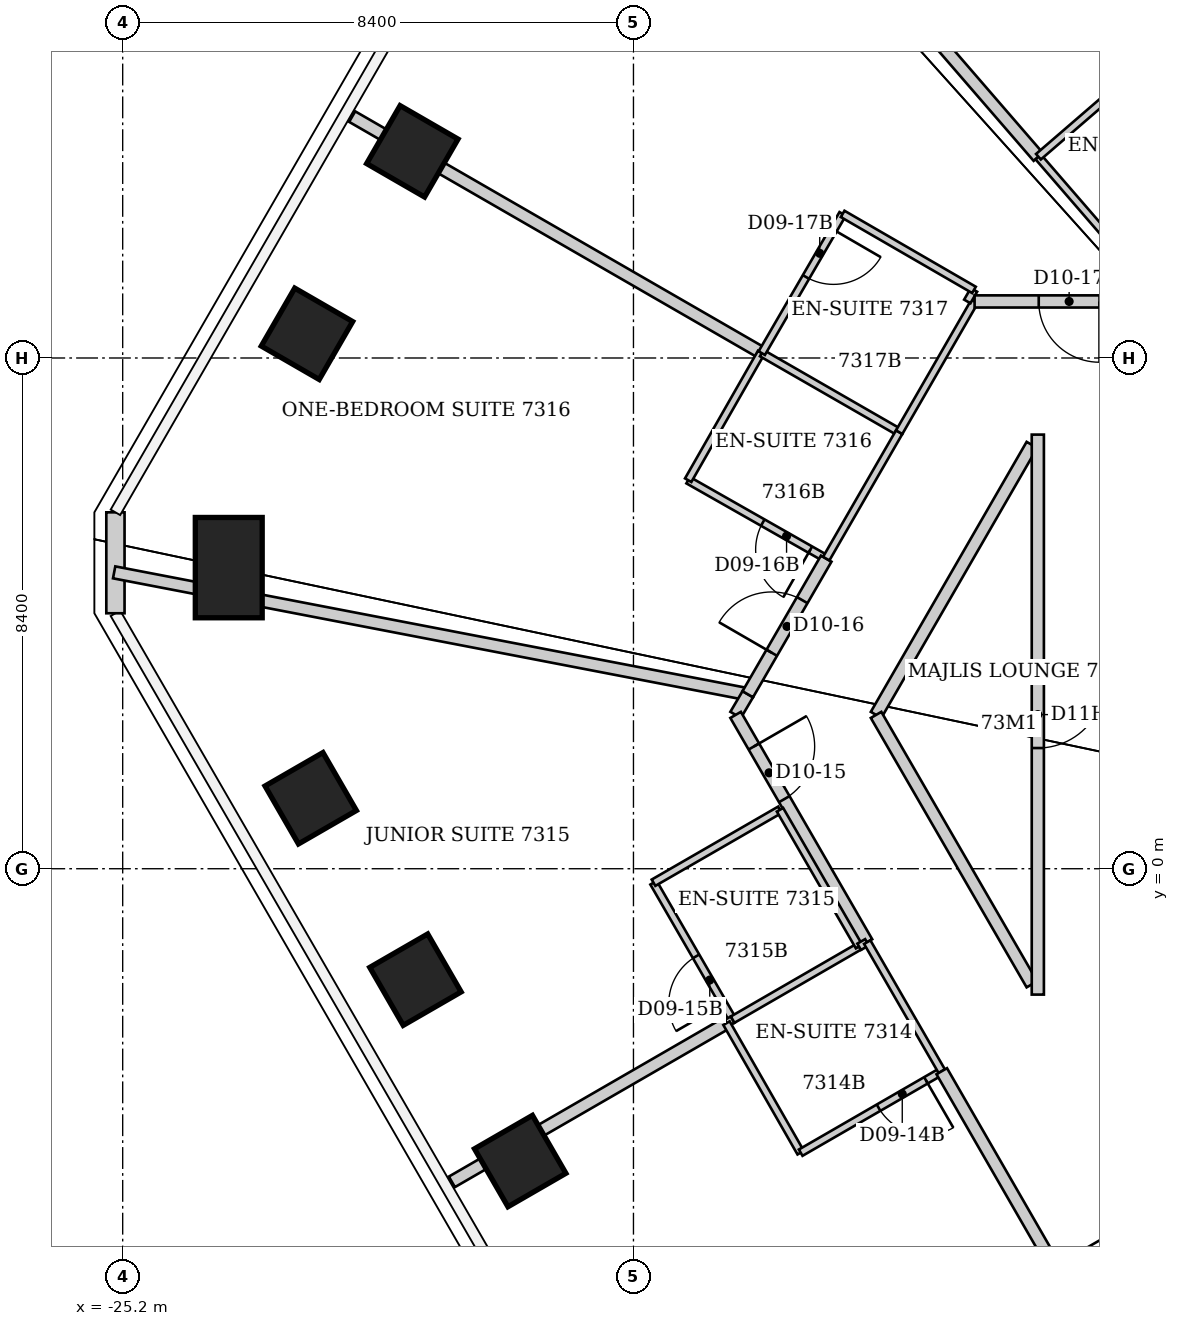
"""IFC4 building model, lengths in metres.
Left out: names, types, materials, properties, quantities, classifications, styles, units other than length and angle.
Written with IfcOpenShell. Run it as: python <this file> out.ifc"""

import sys

from ifc_helpers import new_model, si_unit, direction, frame, frame_2d, origin, origin_2d, place, context, subcontext, project, spatial, rectangle, extrude, element, fill, save


model = new_model("IFC4")
c1 = context("Model", 3, precision=1e-05, world=origin(), true_north=direction((0.0, 1.0)))
c2 = subcontext(c1, "Body", "Model", "MODEL_VIEW")
j1 = project(units=[si_unit("LENGTHUNIT", "METRE"), si_unit("PLANEANGLEUNIT", "RADIAN")], contexts=[c1])
p1 = place(None, origin())
s1 = spatial("IfcSite", under=j1, at=p1, CompositionType="ELEMENT")
p2 = place(p1, origin())
s2 = spatial("IfcBuilding", under=s1, at=p2, CompositionType="ELEMENT")
p3 = place(p2, frame((0.0, 0.0, 291.2)))
s3 = spatial("IfcBuildingStorey", under=s2, at=p3, CompositionType="ELEMENT", Elevation=291.2)
for number, where, z_axis, x_axis in (
    (1, (-18.663, -4.808, 0.0), (0.0, 0.0, 1.0), (-0.866, -0.5, 0.0)),
    (2, (-20.385, -1.824, 0.0), (0.0, 0.0, 1.0), (-0.866, -0.5, 0.0)),
    (3, (-22.108, 1.159, 0.0), (0.0, 0.0, 1.0), (-0.866, -0.5, 0.0)),
):
    element("IfcColumn", number, at=place(p3, frame(where, z_axis=z_axis, x_axis=x_axis)), inside=s3, PredefinedType="COLUMN", context=c2, shape_type="SweptSolid", body=[
        extrude(rectangle(XDim=1.1, YDim=1.1, at=origin_2d()), origin(), (0.0, 0.0, 1.0), 3.8),
    ])
p4 = place(p3, frame((-23.456, 4.952, 0.0), z_axis=(0.0, 0.0, 1.0), x_axis=(-1.0, 0.0, 0.0)))
e4 = element("IfcColumn", 4, at=p4, inside=s3, PredefinedType="COLUMN", context=c2, shape_type="SweptSolid", body=[
    extrude(rectangle(XDim=1.1, YDim=1.65, at=origin_2d()), origin(), (0.0, 0.0, 1.0), 3.8),
])
for number, where, z_axis, x_axis in (
    (5, (-22.169, 8.798, 0.0), (0.0, 0.0, 1.0), (-0.866, 0.5, 0.0)),
    (6, (-20.437, 11.799, 0.0), (0.0, 0.0, 1.0), (-0.866, 0.5, 0.0)),
):
    element("IfcColumn", number, at=place(p3, frame(where, z_axis=z_axis, x_axis=x_axis)), inside=s3, PredefinedType="COLUMN", context=c2, shape_type="SweptSolid", body=[
        extrude(rectangle(XDim=1.1, YDim=1.1, at=origin_2d()), origin(), (0.0, 0.0, 1.0), 3.8),
    ])
p5 = place(p3, frame((-25.319, 4.202, 0.0), z_axis=(0.0, 0.0, 1.0), x_axis=(0.0, 1.0, 0.0)))
e7 = element("IfcWall", 7, at=p5, inside=s3, PredefinedType="SOLIDWALL", context=c2, shape_type="SweptSolid", body=[
    extrude(rectangle(XDim=1.66, YDim=0.3, at=frame_2d((0.83, 0.0))), origin(), (0.0, 0.0, 1.0), 3.64),
])
p6 = place(p3, frame((-25.341, 4.874, 0.0), z_axis=(0.0, 0.0, 1.0), x_axis=(0.982001168061, -0.188874841966, 0.0)))
e8 = element("IfcWall", 8, at=p6, inside=s3, PredefinedType="PARTITIONING", context=c2, shape_type="SweptSolid", body=[
    extrude(rectangle(XDim=10.557, YDim=0.2, at=frame_2d((5.278, 0.0))), origin(), (0.0, 0.0, 1.0), 3.64),
])
p7 = place(p3, frame((-21.426, 12.37, 0.0), z_axis=(0.0, 0.0, 1.0), x_axis=(0.866202335538, -0.499693419917, 0.0)))
e9 = element("IfcWall", 9, at=p7, inside=s3, PredefinedType="PARTITIONING", context=c2, shape_type="SweptSolid", body=[
    extrude(rectangle(XDim=7.765, YDim=0.2, at=frame_2d((3.883, 0.0))), origin(), (0.0, 0.0, 1.0), 2.878),
])
p8 = place(p3, frame((-19.786, -5.15, 0.0), z_axis=(0.0, 0.0, 1.0), x_axis=(0.865819112627, 0.500357136663, 0.0)))
e10 = element("IfcWall", 10, at=p8, inside=s3, PredefinedType="PARTITIONING", context=c2, shape_type="SweptSolid", body=[
    extrude(rectangle(XDim=5.216, YDim=0.2, at=frame_2d((2.608, 0.0))), origin(), (0.0, 0.0, 1.0), 3.64),
])
p9 = place(p3, frame((-16.89, 19.507, 0.0), z_axis=(0.0, 0.0, 1.0), x_axis=(0.654250750888, -0.756277696989, 0.0)))
e11 = element("IfcWall", 11, at=p9, inside=s3, PredefinedType="PARTITIONING", context=c2, shape_type="SweptSolid", body=[
    extrude(rectangle(XDim=10.313, YDim=0.2, at=frame_2d((5.157, 0.0))), origin(), (0.0, 0.0, 1.0), 3.64),
])
p10 = place(p3, frame((-16.47, -0.23, 0.0), z_axis=(0.0, 0.0, 1.0), x_axis=(0.500291685314, -0.865856933682, 0.0)))
e12 = element("IfcWall", 12, at=p10, inside=s3, PredefinedType="PARTITIONING", context=c2, shape_type="SweptSolid", body=[
    extrude(rectangle(XDim=2.599, YDim=0.12, at=frame_2d((1.299, 0.0))), origin(), (0.0, 0.0, 1.0), 3.64),
])
p11 = place(p10, frame((1.399, 0.0, 0.0)))
e13 = element("IfcOpeningElement", 13, at=p11, cuts=e12, PredefinedType="OPENING", context=c2, shape_type="SweptSolid", body=[
    extrude(rectangle(XDim=0.9, YDim=2.03, at=frame_2d((0.45, 1.015))), frame((0.0, 0.06, 0.0), z_axis=(0.0, -1.0, 0.0), x_axis=(1.0, 0.0, 0.0)), (0.0, 0.0, 1.0), 0.12),
])
p12 = place(p3, frame((-15.9, 6.39, 0.0), z_axis=(0.0, 0.0, 1.0), x_axis=(0.869431908012, -0.494052787999, 0.0)))
e14 = element("IfcWall", 14, at=p12, inside=s3, PredefinedType="PARTITIONING", context=c2, shape_type="SweptSolid", body=[
    extrude(rectangle(XDim=2.611, YDim=0.12, at=frame_2d((1.305, 0.0))), origin(), (0.0, 0.0, 1.0), 3.64),
])
p13 = place(p12, frame((1.411, 0.0, 0.0)))
e15 = element("IfcOpeningElement", 15, at=p13, cuts=e14, PredefinedType="OPENING", context=c2, shape_type="SweptSolid", body=[
    extrude(rectangle(XDim=0.9, YDim=2.03, at=frame_2d((0.45, 1.015))), frame((0.0, 0.06, 0.0), z_axis=(0.0, -1.0, 0.0), x_axis=(1.0, 0.0, 0.0)), (0.0, 0.0, 1.0), 0.12),
])
p14 = place(p3, frame((-15.27, -2.54, 0.0), z_axis=(0.0, 0.0, 1.0), x_axis=(0.864612942288, 0.502438513678, 0.0)))
e16 = element("IfcWall", 16, at=p14, inside=s3, PredefinedType="PARTITIONING", context=c2, shape_type="SweptSolid", body=[
    extrude(rectangle(XDim=0.117, YDim=0.12, at=frame_2d((0.058, 0.0))), origin(), (0.0, 0.0, 1.0), 3.64),
])
p15 = place(p3, frame((-15.27, -2.54, 0.0), z_axis=(0.0, 0.0, 1.0), x_axis=(0.497027744361, -0.86773464915, 0.0)))
e17 = element("IfcWall", 17, at=p15, inside=s3, PredefinedType="PARTITIONING", context=c2, shape_type="SweptSolid", body=[
    extrude(rectangle(XDim=2.455, YDim=0.12, at=frame_2d((1.227, 0.0))), origin(), (0.0, 0.0, 1.0), 3.64),
])
p16 = place(p3, frame((-15.169, -2.482, 0.0), z_axis=(0.0, 0.0, 1.0), x_axis=(0.865723129019, 0.500523190154, 0.0)))
e18 = element("IfcWall", 18, at=p16, inside=s3, PredefinedType="PARTITIONING", context=c2, shape_type="SweptSolid", body=[
    extrude(rectangle(XDim=2.401, YDim=0.12, at=frame_2d((1.201, 0.0))), origin(), (0.0, 0.0, 1.0), 3.64),
])
p17 = place(p3, frame((-15.12, 2.53, 0.0), z_axis=(0.0, 0.0, 1.0), x_axis=(0.507290461451, 0.861775137562, 0.0)))
e19 = element("IfcWall", 19, at=p17, inside=s3, PredefinedType="PARTITIONING", context=c2, shape_type="SweptSolid", body=[
    extrude(rectangle(XDim=0.395, YDim=0.2, at=frame_2d((0.197, 0.0))), origin(), (0.0, 0.0, 1.0), 3.64),
])
p18 = place(p3, frame((-15.12, 2.53, 0.0), z_axis=(0.0, 0.0, 1.0), x_axis=(0.500151395541, -0.865937977882, 0.0)))
e20 = element("IfcWall", 20, at=p18, inside=s3, PredefinedType="PARTITIONING", context=c2, shape_type="SweptSolid", body=[
    extrude(rectangle(XDim=4.319, YDim=0.2, at=frame_2d((2.16, 0.0))), origin(), (0.0, 0.0, 1.0), 3.64),
])
p19 = place(p18, frame((0.6, 0.0, 0.0)))
e21 = element("IfcOpeningElement", 21, at=p19, cuts=e20, PredefinedType="OPENING", context=c2, shape_type="SweptSolid", body=[
    extrude(rectangle(XDim=1.0, YDim=2.13, at=frame_2d((0.5, 1.065))), frame((0.0, 0.1, 0.0), z_axis=(0.0, -1.0, 0.0), x_axis=(1.0, 0.0, 0.0)), (0.0, 0.0, 1.0), 0.2),
])
p20 = place(p3, frame((-14.92, 2.87, 0.0), z_axis=(0.0, 0.0, 1.0), x_axis=(0.500714932888, 0.865612243434, 0.0)))
e22 = element("IfcWall", 22, at=p20, inside=s3, PredefinedType="PARTITIONING", context=c2, shape_type="SweptSolid", body=[
    extrude(rectangle(XDim=2.576, YDim=0.2, at=frame_2d((1.288, 0.0))), origin(), (0.0, 0.0, 1.0), 3.64),
])
p21 = place(p20, frame((0.788, 0.0, 0.0)))
e23 = element("IfcOpeningElement", 23, at=p21, cuts=e22, PredefinedType="OPENING", context=c2, shape_type="SweptSolid", body=[
    extrude(rectangle(XDim=1.0, YDim=2.13, at=frame_2d((0.5, 1.065))), frame((0.0, 0.1, 0.0), z_axis=(0.0, -1.0, 0.0), x_axis=(1.0, 0.0, 0.0)), (0.0, 0.0, 1.0), 0.2),
])
p22 = place(p3, frame((-14.7, 8.49, 0.0), z_axis=(0.0, 0.0, 1.0), x_axis=(-0.496106327528, -0.868261776072, 0.0)))
e24 = element("IfcWall", 24, at=p22, inside=s3, PredefinedType="PARTITIONING", context=c2, shape_type="SweptSolid", body=[
    extrude(rectangle(XDim=2.419, YDim=0.12, at=frame_2d((1.209, 0.0))), origin(), (0.0, 0.0, 1.0), 3.64),
])
p23 = place(p3, frame((-14.69, 8.48, 0.0), z_axis=(0.0, 0.0, 1.0), x_axis=(0.866816256489, -0.498627694264, 0.0)))
e25 = element("IfcWall", 25, at=p23, inside=s3, PredefinedType="PARTITIONING", context=c2, shape_type="SweptSolid", body=[
    extrude(rectangle(XDim=2.607, YDim=0.12, at=frame_2d((1.304, 0.0))), origin(), (0.0, 0.0, 1.0), 2.878),
])
p24 = place(p3, frame((-14.39, 0.97, 0.0), z_axis=(0.0, 0.0, 1.0), x_axis=(-0.866202511239, -0.499693115345, 0.0)))
e26 = element("IfcWall", 26, at=p24, inside=s3, PredefinedType="PARTITIONING", context=c2, shape_type="SweptSolid", body=[
    extrude(rectangle(XDim=2.401, YDim=0.12, at=frame_2d((1.201, 0.0))), origin(), (0.0, 0.0, 1.0), 3.64),
])
p25 = place(p3, frame((-14.05, -4.67, 0.0), z_axis=(0.0, 0.0, 1.0), x_axis=(0.865968562295, 0.500098439427, 0.0)))
e27 = element("IfcWall", 27, at=p25, inside=s3, PredefinedType="PARTITIONING", context=c2, shape_type="SweptSolid", body=[
    extrude(rectangle(XDim=2.679, YDim=0.12, at=frame_2d((1.34, 0.0))), origin(), (0.0, 0.0, 1.0), 3.64),
])
p26 = place(p25, frame((1.479, 0.0, 0.0)))
e28 = element("IfcOpeningElement", 28, at=p26, cuts=e27, PredefinedType="OPENING", context=c2, shape_type="SweptSolid", body=[
    extrude(rectangle(XDim=0.9, YDim=2.03, at=frame_2d((0.45, 1.015))), frame((0.0, 0.06, 0.0), z_axis=(0.0, -1.0, 0.0), x_axis=(1.0, 0.0, 0.0)), (0.0, 0.0, 1.0), 0.12),
])
p27 = place(p3, frame((-13.63, 5.1, 0.0), z_axis=(0.0, 0.0, 1.0), x_axis=(0.499737123639, 0.866177122335, 0.0)))
e29 = element("IfcWall", 29, at=p27, inside=s3, PredefinedType="PARTITIONING", context=c2, shape_type="SweptSolid", body=[
    extrude(rectangle(XDim=2.401, YDim=0.12, at=frame_2d((1.201, 0.0))), origin(), (0.0, 0.0, 1.0), 3.64),
])
p28 = place(p3, frame((-13.36, 10.77, 0.0), z_axis=(0.0, 0.0, 1.0), x_axis=(-0.502173326652, -0.864766991738, 0.0)))
e30 = element("IfcWall", 30, at=p28, inside=s3, PredefinedType="PARTITIONING", context=c2, shape_type="SweptSolid", body=[
    extrude(rectangle(XDim=2.648, YDim=0.12, at=frame_2d((1.324, 0.0))), origin(), (0.0, 0.0, 1.0), 3.64),
])
p29 = place(p28, frame((0.3, 0.0, 0.0)))
e31 = element("IfcOpeningElement", 31, at=p29, cuts=e30, PredefinedType="OPENING", context=c2, shape_type="SweptSolid", body=[
    extrude(rectangle(XDim=0.9, YDim=2.03, at=frame_2d((0.45, 1.015))), frame((0.0, 0.06, 0.0), z_axis=(0.0, -1.0, 0.0), x_axis=(1.0, 0.0, 0.0)), (0.0, 0.0, 1.0), 0.12),
])
p30 = place(p3, frame((-13.09, -1.28, 0.0), z_axis=(0.0, 0.0, 1.0), x_axis=(-0.500291685314, 0.865856933682, 0.0)))
e32 = element("IfcWall", 32, at=p30, inside=s3, PredefinedType="PARTITIONING", context=c2, shape_type="SweptSolid", body=[
    extrude(rectangle(XDim=2.599, YDim=0.12, at=frame_2d((1.299, 0.0))), origin(), (0.0, 0.0, 1.0), 3.64),
])
p31 = place(p3, frame((-13.088, -1.283, 0.0), z_axis=(0.0, 0.0, 1.0), x_axis=(0.867120749652, 0.498097987873, 0.0)))
e33 = element("IfcWall", 33, at=p31, inside=s3, PredefinedType="PARTITIONING", context=c2, shape_type="SweptSolid", body=[
    extrude(rectangle(XDim=0.147, YDim=0.12, at=frame_2d((0.074, 0.0))), origin(), (0.0, 0.0, 1.0), 3.64),
])
p32 = place(p3, frame((-12.955, -1.207, 0.0), z_axis=(0.0, 0.0, 1.0), x_axis=(0.499920767294, -0.866071143976, 0.0)))
e34 = element("IfcWall", 34, at=p32, inside=s3, PredefinedType="PARTITIONING", context=c2, shape_type="SweptSolid", body=[
    extrude(rectangle(XDim=2.451, YDim=0.12, at=frame_2d((1.226, 0.0))), origin(), (0.0, 0.0, 1.0), 3.64),
])
p33 = place(p3, frame((-12.81, 2.53, 0.0), z_axis=(0.0, 0.0, 1.0), x_axis=(0.499765047266, 0.86616101132, 0.0)))
e35 = element("IfcWall", 35, at=p33, inside=s3, PredefinedType="PARTITIONING", context=c2, shape_type="SweptSolid", body=[
    extrude(rectangle(XDim=5.127, YDim=0.2, at=frame_2d((2.564, 0.0))), origin(), (0.0, 0.0, 1.0), 3.64),
])
p34 = place(p3, frame((-12.43, 7.18, 0.0), z_axis=(0.0, 0.0, 1.0), x_axis=(0.499577688184, 0.866269088372, 0.0)))
e36 = element("IfcWall", 36, at=p34, inside=s3, PredefinedType="PARTITIONING", context=c2, shape_type="SweptSolid", body=[
    extrude(rectangle(XDim=2.482, YDim=0.12, at=frame_2d((1.241, 0.0))), origin(), (0.0, 0.0, 1.0), 3.64),
])
p35 = place(p3, frame((-11.73, -3.33, 0.0), z_axis=(0.0, 0.0, 1.0), x_axis=(0.499214067722, -0.866478686748, 0.0)))
e37 = element("IfcWall", 37, at=p35, inside=s3, PredefinedType="PARTITIONING", context=c2, shape_type="SweptSolid", body=[
    extrude(rectangle(XDim=8.413, YDim=0.2, at=frame_2d((4.207, 0.0))), origin(), (0.0, 0.0, 1.0), 3.64),
])
p36 = place(p35, frame((3.707, 0.0, 0.0)))
e38 = element("IfcOpeningElement", 38, at=p36, cuts=e37, PredefinedType="OPENING", context=c2, shape_type="SweptSolid", body=[
    extrude(rectangle(XDim=1.0, YDim=2.13, at=frame_2d((0.5, 1.065))), frame((0.0, 0.1, 0.0), z_axis=(0.0, -1.0, 0.0), x_axis=(1.0, 0.0, 0.0)), (0.0, 0.0, 1.0), 0.2),
])
p37 = place(p3, frame((-11.31, 9.33, 0.0), z_axis=(0.0, 0.0, 1.0), x_axis=(0.501518373175, 0.865146994081, 0.0)))
e39 = element("IfcWall", 39, at=p37, inside=s3, PredefinedType="PARTITIONING", context=c2, shape_type="SweptSolid", body=[
    extrude(rectangle(XDim=0.219, YDim=0.12, at=frame_2d((0.11, 0.0))), origin(), (0.0, 0.0, 1.0), 3.64),
])
p38 = place(p3, frame((-11.2, 9.52, 0.0), z_axis=(0.0, 0.0, 1.0), x_axis=(-0.865533423938, 0.500851167559, 0.0)))
e40 = element("IfcWall", 40, at=p38, inside=s3, PredefinedType="PARTITIONING", context=c2, shape_type="SweptSolid", body=[
    extrude(rectangle(XDim=2.496, YDim=0.12, at=frame_2d((1.248, 0.0))), origin(), (0.0, 0.0, 1.0), 3.64),
])
p39 = place(p3, frame((-10.248, -1.901, 0.0), z_axis=(0.0, 0.0, 1.0), x_axis=(-0.500611305161, 0.865672178798, 0.0)))
e41 = element("IfcWall", 41, at=p39, inside=s3, PredefinedType="PARTITIONING", context=c2, shape_type="SweptSolid", body=[
    extrude(rectangle(XDim=5.119, YDim=0.2, at=frame_2d((2.559, 0.0))), origin(), (0.0, 0.0, 1.0), 3.64),
])
p40 = place(p3, frame((-10.15, 7.14, 0.0), z_axis=(0.0, 0.0, 1.0), x_axis=(0.0, -1.0, 0.0)))
e42 = element("IfcWall", 42, at=p40, inside=s3, PredefinedType="PARTITIONING", context=c2, shape_type="SweptSolid", body=[
    extrude(rectangle(XDim=9.21, YDim=0.2, at=frame_2d((4.605, 0.0))), origin(), (0.0, 0.0, 1.0), 3.64),
])
p41 = place(p40, frame((4.055, 0.0, 0.0)))
e43 = element("IfcOpeningElement", 43, at=p41, cuts=e42, PredefinedType="OPENING", context=c2, shape_type="SweptSolid", body=[
    extrude(rectangle(XDim=1.1, YDim=2.2, at=frame_2d((0.55, 1.1))), frame((0.0, 0.1, 0.0), z_axis=(0.0, -1.0, 0.0), x_axis=(1.0, 0.0, 0.0)), (0.0, 0.0, 1.0), 0.2),
])
p42 = place(p3, frame((-10.143, 11.708, 0.0), z_axis=(0.0, 0.0, 1.0), x_axis=(0.65433095071, -0.756208309226, 0.0)))
e44 = element("IfcWall", 44, at=p42, inside=s3, PredefinedType="PARTITIONING", context=c2, shape_type="SweptSolid", body=[
    extrude(rectangle(XDim=2.404, YDim=0.12, at=frame_2d((1.202, 0.0))), origin(), (0.0, 0.0, 1.0), 3.64),
])
p43 = place(p3, frame((-8.17, 13.41, 0.0), z_axis=(0.0, 0.0, 1.0), x_axis=(-0.757086659925, -0.653314464377, 0.0)))
e45 = element("IfcWall", 45, at=p43, inside=s3, PredefinedType="PARTITIONING", context=c2, shape_type="SweptSolid", body=[
    extrude(rectangle(XDim=2.602, YDim=0.12, at=frame_2d((1.301, 0.0))), origin(), (0.0, 0.0, 1.0), 3.64),
])
p44 = place(p3, frame((-8.08, 9.33, 0.0), z_axis=(0.0, 0.0, 1.0), x_axis=(-1.0, 0.0, 0.0)))
e46 = element("IfcWall", 46, at=p44, inside=s3, PredefinedType="PARTITIONING", context=c2, shape_type="SweptSolid", body=[
    extrude(rectangle(XDim=3.11, YDim=0.2, at=frame_2d((1.555, 0.0))), origin(), (0.0, 0.0, 1.0), 3.64),
])
p45 = place(p44, frame((1.055, 0.0, 0.0)))
e47 = element("IfcOpeningElement", 47, at=p45, cuts=e46, PredefinedType="OPENING", context=c2, shape_type="SweptSolid", body=[
    extrude(rectangle(XDim=1.0, YDim=2.13, at=frame_2d((0.5, 1.065))), frame((0.0, 0.1, 0.0), z_axis=(0.0, -1.0, 0.0), x_axis=(1.0, 0.0, 0.0)), (0.0, 0.0, 1.0), 0.2),
])
p46 = place(p26, origin())
e48 = element("IfcDoor", 48, at=p46, inside=s3, OperationType="SINGLE_SWING_RIGHT", PredefinedType="DOOR", context=c2, shape_type="SweptSolid", body=[
    extrude(rectangle(XDim=0.9, YDim=2.03, at=frame_2d((0.45, 1.015))), frame((0.0, 0.025, 0.0), z_axis=(0.0, -1.0, 0.0), x_axis=(1.0, 0.0, 0.0)), (0.0, 0.0, 1.0), 0.05),
])
fill(e28, e48)
p47 = place(p19, origin())
e49 = element("IfcDoor", 49, at=p47, inside=s3, OperationType="SINGLE_SWING_LEFT", PredefinedType="DOOR", context=c2, shape_type="SweptSolid", body=[
    extrude(rectangle(XDim=1.0, YDim=2.13, at=frame_2d((0.5, 1.065))), frame((0.0, 0.025, 0.0), z_axis=(0.0, -1.0, 0.0), x_axis=(1.0, 0.0, 0.0)), (0.0, 0.0, 1.0), 0.05),
])
fill(e21, e49)
p48 = place(p11, origin())
e50 = element("IfcDoor", 50, at=p48, inside=s3, OperationType="SINGLE_SWING_RIGHT", PredefinedType="DOOR", context=c2, shape_type="SweptSolid", body=[
    extrude(rectangle(XDim=0.9, YDim=2.03, at=frame_2d((0.45, 1.015))), frame((0.0, 0.025, 0.0), z_axis=(0.0, -1.0, 0.0), x_axis=(1.0, 0.0, 0.0)), (0.0, 0.0, 1.0), 0.05),
])
fill(e13, e50)
p49 = place(p21, origin())
e51 = element("IfcDoor", 51, at=p49, inside=s3, OperationType="SINGLE_SWING_LEFT", PredefinedType="DOOR", context=c2, shape_type="SweptSolid", body=[
    extrude(rectangle(XDim=1.0, YDim=2.13, at=frame_2d((0.5, 1.065))), frame((0.0, 0.025, 0.0), z_axis=(0.0, -1.0, 0.0), x_axis=(1.0, 0.0, 0.0)), (0.0, 0.0, 1.0), 0.05),
])
fill(e23, e51)
p50 = place(p13, origin())
e52 = element("IfcDoor", 52, at=p50, inside=s3, OperationType="SINGLE_SWING_RIGHT", PredefinedType="DOOR", context=c2, shape_type="SweptSolid", body=[
    extrude(rectangle(XDim=0.9, YDim=2.03, at=frame_2d((0.45, 1.015))), frame((0.0, 0.025, 0.0), z_axis=(0.0, -1.0, 0.0), x_axis=(1.0, 0.0, 0.0)), (0.0, 0.0, 1.0), 0.05),
])
fill(e15, e52)
p51 = place(p45, origin())
e53 = element("IfcDoor", 53, at=p51, inside=s3, OperationType="SINGLE_SWING_LEFT", PredefinedType="DOOR", context=c2, shape_type="SweptSolid", body=[
    extrude(rectangle(XDim=1.0, YDim=2.13, at=frame_2d((0.5, 1.065))), frame((0.0, 0.025, 0.0), z_axis=(0.0, -1.0, 0.0), x_axis=(1.0, 0.0, 0.0)), (0.0, 0.0, 1.0), 0.05),
])
fill(e47, e53)
p52 = place(p29, origin())
e54 = element("IfcDoor", 54, at=p52, inside=s3, OperationType="SINGLE_SWING_LEFT", PredefinedType="DOOR", context=c2, shape_type="SweptSolid", body=[
    extrude(rectangle(XDim=0.9, YDim=2.03, at=frame_2d((0.45, 1.015))), frame((0.0, 0.025, 0.0), z_axis=(0.0, -1.0, 0.0), x_axis=(1.0, 0.0, 0.0)), (0.0, 0.0, 1.0), 0.05),
])
fill(e31, e54)
p53 = place(p41, origin())
e55 = element("IfcDoor", 55, at=p53, inside=s3, OperationType="SINGLE_SWING_LEFT", PredefinedType="DOOR", context=c2, shape_type="SweptSolid", body=[
    extrude(rectangle(XDim=1.1, YDim=2.2, at=frame_2d((0.55, 1.1))), frame((0.0, 0.025, 0.0), z_axis=(0.0, -1.0, 0.0), x_axis=(1.0, 0.0, 0.0)), (0.0, 0.0, 1.0), 0.05),
])
fill(e43, e55)
save(model, sys.argv[1])
